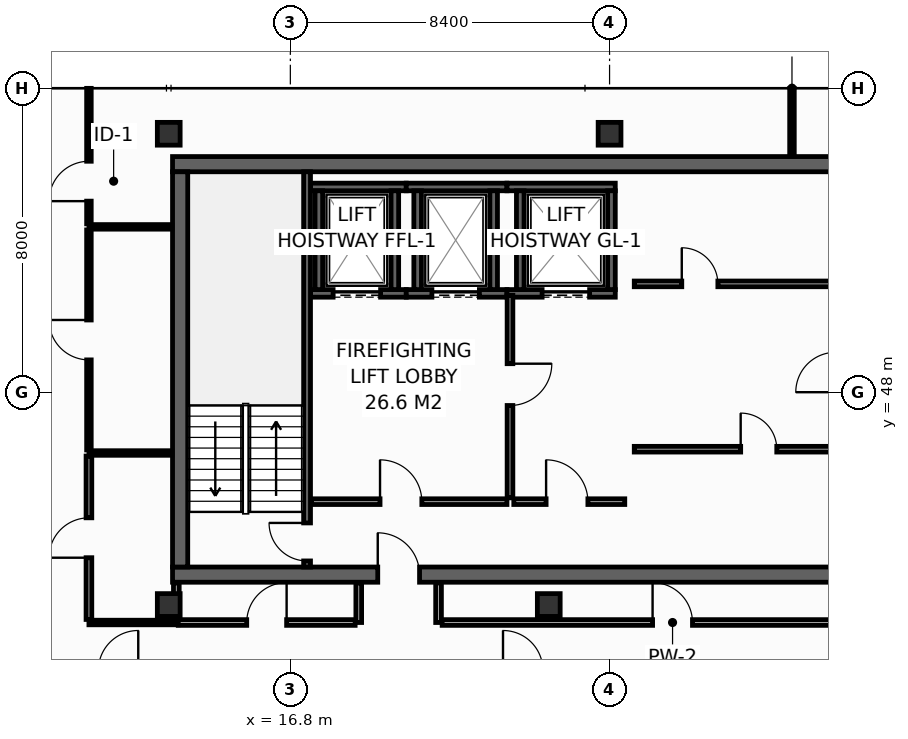
"""IFC4 building model, lengths in metres.
Left out: names, types, materials, properties, quantities, classifications, styles, units other than length and angle.
Written with IfcOpenShell. Run it as: python <this file> out.ifc"""

import sys

from ifc_helpers import new_model, si_unit, direction, frame, frame_2d, origin, origin_2d, place, context, subcontext, project, spatial, rectangle, hollow_rectangle, extrude, element, fill, save


model = new_model("IFC4")
c1 = context("Model", 3, precision=1e-05, world=origin(), true_north=direction((0.0, 1.0)))
c2 = subcontext(c1, "Body", "Model", "MODEL_VIEW")
j1 = project(units=[si_unit("LENGTHUNIT", "METRE"), si_unit("PLANEANGLEUNIT", "RADIAN")], contexts=[c1])
p1 = place(None, origin())
s1 = spatial("IfcSite", under=j1, at=p1, CompositionType="ELEMENT")
p2 = place(p1, origin())
s2 = spatial("IfcBuilding", under=s1, at=p2, CompositionType="ELEMENT")
p3 = place(p2, frame((0.0, 0.0, 299.0)))
s3 = spatial("IfcBuildingStorey", under=s2, at=p3, CompositionType="ELEMENT", Elevation=299.0)
p4 = place(p3, frame((13.7, 43.2, 0.0), z_axis=(0.0, 0.0, 1.0), x_axis=(1.0, 0.0, 0.0)))
e1 = element("IfcWall", 1, at=p4, inside=s3, PredefinedType="SHEAR", context=c2, shape_type="SweptSolid", body=[
    extrude(rectangle(XDim=32.5, YDim=0.4, at=frame_2d((16.25, 0.0))), origin(), (0.0, 0.0, 1.0), 3.55),
])
p5 = place(p4, frame((5.4, 0.0, 0.0)))
e2 = element("IfcOpeningElement", 2, at=p5, cuts=e1, PredefinedType="OPENING", context=c2, shape_type="SweptSolid", body=[
    extrude(rectangle(XDim=1.1, YDim=2.15, at=frame_2d((0.55, 1.075))), frame((0.0, 0.21, 0.0), z_axis=(0.0, -1.0, 0.0), x_axis=(1.0, 0.0, 0.0)), (0.0, 0.0, 1.0), 0.42),
])
p6 = place(p4, frame((25.6, 0.0, 0.0)))
e3 = element("IfcOpeningElement", 3, at=p6, cuts=e1, PredefinedType="OPENING", context=c2, shape_type="SweptSolid", body=[
    extrude(rectangle(XDim=1.1, YDim=2.15, at=frame_2d((0.55, 1.075))), frame((0.0, 0.21, 0.0), z_axis=(0.0, -1.0, 0.0), x_axis=(1.0, 0.0, 0.0)), (0.0, 0.0, 1.0), 0.42),
])
p7 = place(p3, frame((13.7, 54.0, 0.0), z_axis=(0.0, 0.0, 1.0), x_axis=(1.0, 0.0, 0.0)))
e4 = element("IfcWall", 4, at=p7, inside=s3, PredefinedType="SHEAR", context=c2, shape_type="SweptSolid", body=[
    extrude(rectangle(XDim=32.5, YDim=0.4, at=frame_2d((16.25, 0.0))), origin(), (0.0, 0.0, 1.0), 3.55),
])
p8 = place(p3, frame((13.9, 43.4, 0.0), z_axis=(0.0, 0.0, 1.0), x_axis=(0.0, 1.0, 0.0)))
e5 = element("IfcWall", 5, at=p8, inside=s3, PredefinedType="SHEAR", context=c2, shape_type="SweptSolid", body=[
    extrude(rectangle(XDim=10.4, YDim=0.4, at=frame_2d((5.2, 0.0))), origin(), (0.0, 0.0, 1.0), 3.55),
])
for number, where, z_axis, x_axis in (
    (6, (13.6, 54.8, 0.0), (0.0, 0.0, 1.0), (1.0, 0.0, 0.0)),
    (7, (25.2, 54.8, 0.0), (0.0, 0.0, 1.0), (1.0, 0.0, 0.0)),
    (8, (13.6, 42.4, 0.0), (0.0, 0.0, 1.0), (1.0, 0.0, 0.0)),
    (9, (23.6, 42.4, 0.0), (0.0, 0.0, 1.0), (1.0, 0.0, 0.0)),
):
    element("IfcColumn", number, at=place(p3, frame(where, z_axis=z_axis, x_axis=x_axis)), inside=s3, PredefinedType="COLUMN", context=c2, shape_type="SweptSolid", body=[
        extrude(hollow_rectangle(XDim=0.6, YDim=0.6, WallThickness=0.028, at=origin_2d()), origin(), (0.0, 0.0, 1.0), 3.8),
    ])
p9 = place(p3, frame((17.33, 50.6, 0.0), z_axis=(0.0, 0.0, 1.0), x_axis=(1.0, 0.0, 0.0)))
e10 = element("IfcWall", 10, at=p9, inside=s3, PredefinedType="SHEAR", context=c2, shape_type="SweptSolid", body=[
    extrude(rectangle(XDim=2.52, YDim=0.2, at=frame_2d((1.26, 0.0))), origin(), (0.0, 0.0, 1.0), 3.55),
])
p10 = place(p9, frame((0.595, 0.0, 0.0)))
e11 = element("IfcOpeningElement", 11, at=p10, cuts=e10, PredefinedType="OPENING", context=c2, shape_type="SweptSolid", body=[
    extrude(rectangle(XDim=1.25, YDim=2.3, at=frame_2d((0.625, 1.15))), frame((0.0, 0.11, 0.0), z_axis=(0.0, -1.0, 0.0), x_axis=(1.0, 0.0, 0.0)), (0.0, 0.0, 1.0), 0.22),
])
p11 = place(p3, frame((17.33, 53.4, 0.0), z_axis=(0.0, 0.0, 1.0), x_axis=(1.0, 0.0, 0.0)))
e12 = element("IfcWall", 12, at=p11, inside=s3, PredefinedType="SHEAR", context=c2, shape_type="SweptSolid", body=[
    extrude(rectangle(XDim=2.52, YDim=0.2, at=frame_2d((1.26, 0.0))), origin(), (0.0, 0.0, 1.0), 3.55),
])
for number, where, z_axis, x_axis in (
    (13, (17.55, 50.7, 0.0), (0.0, 0.0, 1.0), (0.0, 1.0, 0.0)),
    (14, (19.55, 50.7, 0.0), (0.0, 0.0, 1.0), (0.0, 1.0, 0.0)),
):
    element("IfcWall", number, at=place(p3, frame(where, z_axis=z_axis, x_axis=x_axis)), inside=s3, PredefinedType="SHEAR", context=c2, shape_type="SweptSolid", body=[
        extrude(rectangle(XDim=2.6, YDim=0.2, at=frame_2d((1.3, 0.0))), origin(), (0.0, 0.0, 1.0), 3.55),
    ])
p12 = place(p3, frame((19.85, 50.6, 0.0), z_axis=(0.0, 0.0, 1.0), x_axis=(1.0, 0.0, 0.0)))
e15 = element("IfcWall", 15, at=p12, inside=s3, PredefinedType="SHEAR", context=c2, shape_type="SweptSolid", body=[
    extrude(rectangle(XDim=2.65, YDim=0.2, at=frame_2d((1.325, 0.0))), origin(), (0.0, 0.0, 1.0), 3.55),
])
p13 = place(p12, frame((0.675, 0.0, 0.0)))
e16 = element("IfcOpeningElement", 16, at=p13, cuts=e15, PredefinedType="OPENING", context=c2, shape_type="SweptSolid", body=[
    extrude(rectangle(XDim=1.25, YDim=2.3, at=frame_2d((0.625, 1.15))), frame((0.0, 0.11, 0.0), z_axis=(0.0, -1.0, 0.0), x_axis=(1.0, 0.0, 0.0)), (0.0, 0.0, 1.0), 0.22),
])
p14 = place(p3, frame((19.85, 53.4, 0.0), z_axis=(0.0, 0.0, 1.0), x_axis=(1.0, 0.0, 0.0)))
e17 = element("IfcWall", 17, at=p14, inside=s3, PredefinedType="SHEAR", context=c2, shape_type="SweptSolid", body=[
    extrude(rectangle(XDim=2.65, YDim=0.2, at=frame_2d((1.325, 0.0))), origin(), (0.0, 0.0, 1.0), 3.55),
])
for number, where, z_axis, x_axis in (
    (18, (20.15, 50.7, 0.0), (0.0, 0.0, 1.0), (0.0, 1.0, 0.0)),
    (19, (22.15, 50.7, 0.0), (0.0, 0.0, 1.0), (0.0, 1.0, 0.0)),
):
    element("IfcWall", number, at=place(p3, frame(where, z_axis=z_axis, x_axis=x_axis)), inside=s3, PredefinedType="SHEAR", context=c2, shape_type="SweptSolid", body=[
        extrude(rectangle(XDim=2.6, YDim=0.2, at=frame_2d((1.3, 0.0))), origin(), (0.0, 0.0, 1.0), 3.55),
    ])
p15 = place(p3, frame((22.5, 50.6, 0.0), z_axis=(0.0, 0.0, 1.0), x_axis=(1.0, 0.0, 0.0)))
e20 = element("IfcWall", 20, at=p15, inside=s3, PredefinedType="SHEAR", context=c2, shape_type="SweptSolid", body=[
    extrude(rectangle(XDim=2.85, YDim=0.2, at=frame_2d((1.425, 0.0))), origin(), (0.0, 0.0, 1.0), 3.55),
])
p16 = place(p15, frame((0.925, 0.0, 0.0)))
e21 = element("IfcOpeningElement", 21, at=p16, cuts=e20, PredefinedType="OPENING", context=c2, shape_type="SweptSolid", body=[
    extrude(rectangle(XDim=1.25, YDim=2.3, at=frame_2d((0.625, 1.15))), frame((0.0, 0.11, 0.0), z_axis=(0.0, -1.0, 0.0), x_axis=(1.0, 0.0, 0.0)), (0.0, 0.0, 1.0), 0.22),
])
p17 = place(p3, frame((22.5, 53.4, 0.0), z_axis=(0.0, 0.0, 1.0), x_axis=(1.0, 0.0, 0.0)))
e22 = element("IfcWall", 22, at=p17, inside=s3, PredefinedType="SHEAR", context=c2, shape_type="SweptSolid", body=[
    extrude(rectangle(XDim=2.85, YDim=0.2, at=frame_2d((1.425, 0.0))), origin(), (0.0, 0.0, 1.0), 3.55),
])
for number, where, z_axis, x_axis in (
    (23, (22.85, 50.7, 0.0), (0.0, 0.0, 1.0), (0.0, 1.0, 0.0)),
    (24, (25.25, 50.7, 0.0), (0.0, 0.0, 1.0), (0.0, 1.0, 0.0)),
):
    element("IfcWall", number, at=place(p3, frame(where, z_axis=z_axis, x_axis=x_axis)), inside=s3, PredefinedType="SHEAR", context=c2, shape_type="SweptSolid", body=[
        extrude(rectangle(XDim=2.6, YDim=0.2, at=frame_2d((1.3, 0.0))), origin(), (0.0, 0.0, 1.0), 3.55),
    ])
p18 = place(p3, frame((17.24, 43.4, 0.0), z_axis=(0.0, 0.0, 1.0), x_axis=(0.0, 1.0, 0.0)))
e25 = element("IfcWall", 25, at=p18, inside=s3, PredefinedType="SHEAR", context=c2, shape_type="SweptSolid", body=[
    extrude(rectangle(XDim=10.4, YDim=0.18, at=frame_2d((5.2, 0.0))), origin(), (0.0, 0.0, 1.0), 3.55),
])
p19 = place(p18, frame((0.16, 0.0, 0.0)))
e26 = element("IfcOpeningElement", 26, at=p19, cuts=e25, PredefinedType="OPENING", context=c2, shape_type="SweptSolid", body=[
    extrude(rectangle(XDim=1.0, YDim=2.15, at=frame_2d((0.5, 1.075))), frame((0.0, 0.1, 0.0), z_axis=(0.0, -1.0, 0.0), x_axis=(1.0, 0.0, 0.0)), (0.0, 0.0, 1.0), 0.2),
])
p20 = place(p3, frame((17.36, 45.12, 0.0), z_axis=(0.0, 0.0, 1.0), x_axis=(1.0, 0.0, 0.0)))
e27 = element("IfcWall", 27, at=p20, inside=s3, PredefinedType="PARTITIONING", context=c2, shape_type="SweptSolid", body=[
    extrude(rectangle(XDim=5.14, YDim=0.15, at=frame_2d((2.57, 0.0))), origin(), (0.0, 0.0, 1.0), 3.55),
])
p21 = place(p20, frame((1.8, 0.0, 0.0)))
e28 = element("IfcOpeningElement", 28, at=p21, cuts=e27, PredefinedType="OPENING", context=c2, shape_type="SweptSolid", body=[
    extrude(rectangle(XDim=1.1, YDim=2.15, at=frame_2d((0.55, 1.075))), frame((0.0, 0.085, 0.0), z_axis=(0.0, -1.0, 0.0), x_axis=(1.0, 0.0, 0.0)), (0.0, 0.0, 1.0), 0.17),
])
p22 = place(p3, frame((22.58, 50.55, 0.0), z_axis=(0.0, 0.0, 1.0), x_axis=(0.0, -1.0, 0.0)))
e29 = element("IfcWall", 29, at=p22, inside=s3, PredefinedType="PARTITIONING", context=c2, shape_type="SweptSolid", body=[
    extrude(rectangle(XDim=5.33, YDim=0.15, at=frame_2d((2.665, 0.0))), origin(), (0.0, 0.0, 1.0), 3.55),
])
p23 = place(p22, frame((1.8, 0.0, 0.0)))
e30 = element("IfcOpeningElement", 30, at=p23, cuts=e29, PredefinedType="OPENING", context=c2, shape_type="SweptSolid", body=[
    extrude(rectangle(XDim=1.1, YDim=2.15, at=frame_2d((0.55, 1.075))), frame((0.0, 0.085, 0.0), z_axis=(0.0, -1.0, 0.0), x_axis=(1.0, 0.0, 0.0)), (0.0, 0.0, 1.0), 0.17),
])
p24 = place(p3, frame((22.68, 45.12, 0.0), z_axis=(0.0, 0.0, 1.0), x_axis=(1.0, 0.0, 0.0)))
e31 = element("IfcWall", 31, at=p24, inside=s3, PredefinedType="PARTITIONING", context=c2, shape_type="SweptSolid", body=[
    extrude(rectangle(XDim=2.92, YDim=0.15, at=frame_2d((1.46, 0.0))), origin(), (0.0, 0.0, 1.0), 3.55),
])
p25 = place(p24, frame((0.85, 0.0, 0.0)))
e32 = element("IfcOpeningElement", 32, at=p25, cuts=e31, PredefinedType="OPENING", context=c2, shape_type="SweptSolid", body=[
    extrude(rectangle(XDim=1.1, YDim=2.15, at=frame_2d((0.55, 1.075))), frame((0.0, 0.085, 0.0), z_axis=(0.0, -1.0, 0.0), x_axis=(1.0, 0.0, 0.0)), (0.0, 0.0, 1.0), 0.17),
])
p26 = place(p3, frame((25.85, 50.85, 0.0), z_axis=(0.0, 0.0, 1.0), x_axis=(1.0, 0.0, 0.0)))
e33 = element("IfcWall", 33, at=p26, inside=s3, PredefinedType="PARTITIONING", context=c2, shape_type="SweptSolid", body=[
    extrude(rectangle(XDim=7.65, YDim=0.15, at=frame_2d((3.825, 0.0))), origin(), (0.0, 0.0, 1.0), 3.55),
])
p27 = place(p26, frame((1.25, 0.0, 0.0)))
e34 = element("IfcOpeningElement", 34, at=p27, cuts=e33, PredefinedType="OPENING", context=c2, shape_type="SweptSolid", body=[
    extrude(rectangle(XDim=0.95, YDim=2.15, at=frame_2d((0.475, 1.075))), frame((0.0, 0.085, 0.0), z_axis=(0.0, -1.0, 0.0), x_axis=(1.0, 0.0, 0.0)), (0.0, 0.0, 1.0), 0.17),
])
p28 = place(p3, frame((25.85, 46.5, 0.0), z_axis=(0.0, 0.0, 1.0), x_axis=(1.0, 0.0, 0.0)))
e35 = element("IfcWall", 35, at=p28, inside=s3, PredefinedType="PARTITIONING", context=c2, shape_type="SweptSolid", body=[
    extrude(rectangle(XDim=7.65, YDim=0.15, at=frame_2d((3.825, 0.0))), origin(), (0.0, 0.0, 1.0), 3.55),
])
p29 = place(p28, frame((2.8, 0.0, 0.0)))
e36 = element("IfcOpeningElement", 36, at=p29, cuts=e35, PredefinedType="OPENING", context=c2, shape_type="SweptSolid", body=[
    extrude(rectangle(XDim=0.95, YDim=2.15, at=frame_2d((0.475, 1.075))), frame((0.0, 0.085, 0.0), z_axis=(0.0, -1.0, 0.0), x_axis=(1.0, 0.0, 0.0)), (0.0, 0.0, 1.0), 0.17),
])
p30 = place(p3, frame((11.5, 41.94, 0.0), z_axis=(0.0, 0.0, 1.0), x_axis=(1.0, 0.0, 0.0)))
e37 = element("IfcWall", 37, at=p30, inside=s3, PredefinedType="PARTITIONING", context=c2, shape_type="SweptSolid", body=[
    extrude(rectangle(XDim=2.35, YDim=0.12, at=frame_2d((1.175, 0.0))), origin(), (0.0, 0.0, 1.0), 3.55),
])
p31 = place(p3, frame((11.5, 52.35, 0.0), z_axis=(0.0, 0.0, 1.0), x_axis=(1.0, 0.0, 0.0)))
e38 = element("IfcWall", 38, at=p31, inside=s3, PredefinedType="PARTITIONING", context=c2, shape_type="SweptSolid", body=[
    extrude(rectangle(XDim=2.18, YDim=0.12, at=frame_2d((1.09, 0.0))), origin(), (0.0, 0.0, 1.0), 3.55),
])
p32 = place(p3, frame((30.0, 54.22, 0.0), z_axis=(0.0, 0.0, 1.0), x_axis=(0.0, 1.0, 0.0)))
e39 = element("IfcWall", 39, at=p32, inside=s3, PredefinedType="PARTITIONING", context=c2, shape_type="SweptSolid", body=[
    extrude(rectangle(XDim=1.775, YDim=0.12, at=frame_2d((0.888, 0.0))), origin(), (0.0, 0.0, 1.0), 2.935),
])
p33 = place(p3, frame((11.5, 52.43, 0.0), z_axis=(0.0, 0.0, 1.0), x_axis=(0.0, 1.0, 0.0)))
e40 = element("IfcWall", 40, at=p33, inside=s3, PredefinedType="PARTITIONING", context=c2, shape_type="SweptSolid", body=[
    extrude(rectangle(XDim=3.565, YDim=0.12, at=frame_2d((1.783, 0.0))), origin(), (0.0, 0.0, 1.0), 2.935),
])
p34 = place(p33, frame((0.597, 0.0, 0.0)))
e41 = element("IfcOpeningElement", 41, at=p34, cuts=e40, PredefinedType="OPENING", context=c2, shape_type="SweptSolid", body=[
    extrude(rectangle(XDim=1.05, YDim=2.15, at=frame_2d((0.525, 1.075))), frame((0.0, 0.07, 0.0), z_axis=(0.0, -1.0, 0.0), x_axis=(1.0, 0.0, 0.0)), (0.0, 0.0, 1.0), 0.14),
])
p35 = place(p3, frame((11.5, 46.4, 0.0), z_axis=(0.0, 0.0, 1.0), x_axis=(1.0, 0.0, 0.0)))
e42 = element("IfcWall", 42, at=p35, inside=s3, PredefinedType="PARTITIONING", context=c2, shape_type="SweptSolid", body=[
    extrude(rectangle(XDim=2.18, YDim=0.12, at=frame_2d((1.09, 0.0))), origin(), (0.0, 0.0, 1.0), 3.55),
])
p36 = place(p3, frame((11.5, 42.02, 0.0), z_axis=(0.0, 0.0, 1.0), x_axis=(0.0, 1.0, 0.0)))
e43 = element("IfcWall", 43, at=p36, inside=s3, PredefinedType="PARTITIONING", context=c2, shape_type="SweptSolid", body=[
    extrude(rectangle(XDim=4.3, YDim=0.15, at=frame_2d((2.15, 0.0))), origin(), (0.0, 0.0, 1.0), 2.947),
])
p37 = place(p36, frame((1.625, 0.0, 0.0)))
e44 = element("IfcOpeningElement", 44, at=p37, cuts=e43, PredefinedType="OPENING", context=c2, shape_type="SweptSolid", body=[
    extrude(rectangle(XDim=1.05, YDim=2.15, at=frame_2d((0.525, 1.075))), frame((0.0, 0.085, 0.0), z_axis=(0.0, -1.0, 0.0), x_axis=(1.0, 0.0, 0.0)), (0.0, 0.0, 1.0), 0.17),
])
p38 = place(p3, frame((11.5, 46.48, 0.0), z_axis=(0.0, 0.0, 1.0), x_axis=(0.0, 1.0, 0.0)))
e45 = element("IfcWall", 45, at=p38, inside=s3, PredefinedType="PARTITIONING", context=c2, shape_type="SweptSolid", body=[
    extrude(rectangle(XDim=5.79, YDim=0.12, at=frame_2d((2.895, 0.0))), origin(), (0.0, 0.0, 1.0), 3.55),
])
p39 = place(p38, frame((2.37, 0.0, 0.0)))
e46 = element("IfcOpeningElement", 46, at=p39, cuts=e45, PredefinedType="OPENING", context=c2, shape_type="SweptSolid", body=[
    extrude(rectangle(XDim=1.05, YDim=2.15, at=frame_2d((0.525, 1.075))), frame((0.0, 0.07, 0.0), z_axis=(0.0, -1.0, 0.0), x_axis=(1.0, 0.0, 0.0)), (0.0, 0.0, 1.0), 0.14),
])
p40 = place(p3, frame((13.8, 42.02, 0.0), z_axis=(0.0, 0.0, 1.0), x_axis=(0.0, 1.0, 0.0)))
e47 = element("IfcWall", 47, at=p40, inside=s3, PredefinedType="PARTITIONING", context=c2, shape_type="SweptSolid", body=[
    extrude(rectangle(XDim=0.96, YDim=0.15, at=frame_2d((0.48, 0.0))), origin(), (0.0, 0.0, 1.0), 3.55),
])
for number, where, z_axis, x_axis in (
    (48, (18.6, 41.94, 0.0), (0.0, 0.0, 1.0), (0.0, 1.0, 0.0)),
    (49, (20.7, 41.94, 0.0), (0.0, 0.0, 1.0), (0.0, 1.0, 0.0)),
):
    element("IfcWall", number, at=place(p3, frame(where, z_axis=z_axis, x_axis=x_axis)), inside=s3, PredefinedType="PARTITIONING", context=c2, shape_type="SweptSolid", body=[
        extrude(rectangle(XDim=1.04, YDim=0.15, at=frame_2d((0.52, 0.0))), origin(), (0.0, 0.0, 1.0), 3.55),
    ])
p41 = place(p3, frame((13.85, 41.94, 0.0), z_axis=(0.0, 0.0, 1.0), x_axis=(1.0, 0.0, 0.0)))
e50 = element("IfcWall", 50, at=p41, inside=s3, PredefinedType="PARTITIONING", context=c2, shape_type="SweptSolid", body=[
    extrude(rectangle(XDim=4.655, YDim=0.15, at=frame_2d((2.327, 0.0))), origin(), (0.0, 0.0, 1.0), 3.55),
])
p42 = place(p41, frame((1.802, 0.0, 0.0)))
e51 = element("IfcOpeningElement", 51, at=p42, cuts=e50, PredefinedType="OPENING", context=c2, shape_type="SweptSolid", body=[
    extrude(rectangle(XDim=1.05, YDim=2.15, at=frame_2d((0.525, 1.075))), frame((0.0, 0.085, 0.0), z_axis=(0.0, -1.0, 0.0), x_axis=(1.0, 0.0, 0.0)), (0.0, 0.0, 1.0), 0.17),
])
p43 = place(p3, frame((20.795, 41.94, 0.0), z_axis=(0.0, 0.0, 1.0), x_axis=(1.0, 0.0, 0.0)))
e52 = element("IfcWall", 52, at=p43, inside=s3, PredefinedType="PARTITIONING", context=c2, shape_type="SweptSolid", body=[
    extrude(rectangle(XDim=12.125, YDim=0.15, at=frame_2d((6.062, 0.0))), origin(), (0.0, 0.0, 1.0), 3.047),
])
p44 = place(p43, frame((5.537, 0.0, 0.0)))
e53 = element("IfcOpeningElement", 53, at=p44, cuts=e52, PredefinedType="OPENING", context=c2, shape_type="SweptSolid", body=[
    extrude(rectangle(XDim=1.05, YDim=2.15, at=frame_2d((0.525, 1.075))), frame((0.0, 0.085, 0.0), z_axis=(0.0, -1.0, 0.0), x_axis=(1.0, 0.0, 0.0)), (0.0, 0.0, 1.0), 0.17),
])
p45 = place(p10, origin())
e54 = element("IfcDoor", 54, at=p45, inside=s3, OperationType="SLIDING_TO_LEFT", PredefinedType="DOOR", context=c2, shape_type="SweptSolid", body=[
    extrude(rectangle(XDim=1.25, YDim=2.3, at=frame_2d((0.625, 1.15))), frame((0.0, 0.025, 0.0), z_axis=(0.0, -1.0, 0.0), x_axis=(1.0, 0.0, 0.0)), (0.0, 0.0, 1.0), 0.05),
])
fill(e11, e54)
p46 = place(p13, origin())
e55 = element("IfcDoor", 55, at=p46, inside=s3, OperationType="SLIDING_TO_LEFT", PredefinedType="DOOR", context=c2, shape_type="SweptSolid", body=[
    extrude(rectangle(XDim=1.25, YDim=2.3, at=frame_2d((0.625, 1.15))), frame((0.0, 0.025, 0.0), z_axis=(0.0, -1.0, 0.0), x_axis=(1.0, 0.0, 0.0)), (0.0, 0.0, 1.0), 0.05),
])
fill(e16, e55)
p47 = place(p16, origin())
e56 = element("IfcDoor", 56, at=p47, inside=s3, OperationType="SLIDING_TO_LEFT", PredefinedType="DOOR", context=c2, shape_type="SweptSolid", body=[
    extrude(rectangle(XDim=1.25, YDim=2.3, at=frame_2d((0.625, 1.15))), frame((0.0, 0.025, 0.0), z_axis=(0.0, -1.0, 0.0), x_axis=(1.0, 0.0, 0.0)), (0.0, 0.0, 1.0), 0.05),
])
fill(e21, e56)
p48 = place(p19, origin())
e57 = element("IfcDoor", 57, at=p48, inside=s3, OperationType="SINGLE_SWING_RIGHT", PredefinedType="DOOR", context=c2, shape_type="SweptSolid", body=[
    extrude(rectangle(XDim=1.0, YDim=2.15, at=frame_2d((0.5, 1.075))), frame((0.0, 0.025, 0.0), z_axis=(0.0, -1.0, 0.0), x_axis=(1.0, 0.0, 0.0)), (0.0, 0.0, 1.0), 0.05),
])
fill(e26, e57)
p49 = place(p21, origin())
e58 = element("IfcDoor", 58, at=p49, inside=s3, OperationType="SINGLE_SWING_LEFT", PredefinedType="DOOR", context=c2, shape_type="SweptSolid", body=[
    extrude(rectangle(XDim=1.1, YDim=2.15, at=frame_2d((0.55, 1.075))), frame((0.0, 0.025, 0.0), z_axis=(0.0, -1.0, 0.0), x_axis=(1.0, 0.0, 0.0)), (0.0, 0.0, 1.0), 0.05),
])
fill(e28, e58)
p50 = place(p23, origin())
e59 = element("IfcDoor", 59, at=p50, inside=s3, OperationType="SINGLE_SWING_LEFT", PredefinedType="DOOR", context=c2, shape_type="SweptSolid", body=[
    extrude(rectangle(XDim=1.1, YDim=2.15, at=frame_2d((0.55, 1.075))), frame((0.0, 0.025, 0.0), z_axis=(0.0, -1.0, 0.0), x_axis=(1.0, 0.0, 0.0)), (0.0, 0.0, 1.0), 0.05),
])
fill(e30, e59)
p51 = place(p25, origin())
e60 = element("IfcDoor", 60, at=p51, inside=s3, OperationType="SINGLE_SWING_LEFT", PredefinedType="DOOR", context=c2, shape_type="SweptSolid", body=[
    extrude(rectangle(XDim=1.1, YDim=2.15, at=frame_2d((0.55, 1.075))), frame((0.0, 0.025, 0.0), z_axis=(0.0, -1.0, 0.0), x_axis=(1.0, 0.0, 0.0)), (0.0, 0.0, 1.0), 0.05),
])
fill(e32, e60)
p52 = place(p5, origin())
e61 = element("IfcDoor", 61, at=p52, inside=s3, OperationType="SINGLE_SWING_LEFT", PredefinedType="DOOR", context=c2, shape_type="SweptSolid", body=[
    extrude(rectangle(XDim=1.1, YDim=2.15, at=frame_2d((0.55, 1.075))), frame((0.0, 0.025, 0.0), z_axis=(0.0, -1.0, 0.0), x_axis=(1.0, 0.0, 0.0)), (0.0, 0.0, 1.0), 0.05),
])
fill(e2, e61)
p53 = place(p27, origin())
e62 = element("IfcDoor", 62, at=p53, inside=s3, OperationType="SINGLE_SWING_LEFT", PredefinedType="DOOR", context=c2, shape_type="SweptSolid", body=[
    extrude(rectangle(XDim=0.95, YDim=2.15, at=frame_2d((0.475, 1.075))), frame((0.0, 0.025, 0.0), z_axis=(0.0, -1.0, 0.0), x_axis=(1.0, 0.0, 0.0)), (0.0, 0.0, 1.0), 0.05),
])
fill(e34, e62)
p54 = place(p29, origin())
e63 = element("IfcDoor", 63, at=p54, inside=s3, OperationType="SINGLE_SWING_LEFT", PredefinedType="DOOR", context=c2, shape_type="SweptSolid", body=[
    extrude(rectangle(XDim=0.95, YDim=2.15, at=frame_2d((0.475, 1.075))), frame((0.0, 0.025, 0.0), z_axis=(0.0, -1.0, 0.0), x_axis=(1.0, 0.0, 0.0)), (0.0, 0.0, 1.0), 0.05),
])
fill(e36, e63)
p55 = place(p34, origin())
e64 = element("IfcDoor", 64, at=p55, inside=s3, OperationType="SINGLE_SWING_LEFT", PredefinedType="DOOR", context=c2, shape_type="SweptSolid", body=[
    extrude(rectangle(XDim=1.05, YDim=2.15, at=frame_2d((0.525, 1.075))), frame((0.0, 0.025, 0.0), z_axis=(0.0, -1.0, 0.0), x_axis=(1.0, 0.0, 0.0)), (0.0, 0.0, 1.0), 0.05),
])
fill(e41, e64)
p56 = place(p37, origin())
e65 = element("IfcDoor", 65, at=p56, inside=s3, OperationType="SINGLE_SWING_LEFT", PredefinedType="DOOR", context=c2, shape_type="SweptSolid", body=[
    extrude(rectangle(XDim=1.05, YDim=2.15, at=frame_2d((0.525, 1.075))), frame((0.0, 0.025, 0.0), z_axis=(0.0, -1.0, 0.0), x_axis=(1.0, 0.0, 0.0)), (0.0, 0.0, 1.0), 0.05),
])
fill(e44, e65)
p57 = place(p39, origin())
e66 = element("IfcDoor", 66, at=p57, inside=s3, OperationType="SINGLE_SWING_RIGHT", PredefinedType="DOOR", context=c2, shape_type="SweptSolid", body=[
    extrude(rectangle(XDim=1.05, YDim=2.15, at=frame_2d((0.525, 1.075))), frame((0.0, 0.025, 0.0), z_axis=(0.0, -1.0, 0.0), x_axis=(1.0, 0.0, 0.0)), (0.0, 0.0, 1.0), 0.05),
])
fill(e46, e66)
p58 = place(p42, origin())
e67 = element("IfcDoor", 67, at=p58, inside=s3, OperationType="SINGLE_SWING_RIGHT", PredefinedType="DOOR", context=c2, shape_type="SweptSolid", body=[
    extrude(rectangle(XDim=1.05, YDim=2.15, at=frame_2d((0.525, 1.075))), frame((0.0, 0.025, 0.0), z_axis=(0.0, -1.0, 0.0), x_axis=(1.0, 0.0, 0.0)), (0.0, 0.0, 1.0), 0.05),
])
fill(e51, e67)
p59 = place(p44, origin())
e68 = element("IfcDoor", 68, at=p59, inside=s3, OperationType="SINGLE_SWING_LEFT", PredefinedType="DOOR", context=c2, shape_type="SweptSolid", body=[
    extrude(rectangle(XDim=1.05, YDim=2.15, at=frame_2d((0.525, 1.075))), frame((0.0, 0.025, 0.0), z_axis=(0.0, -1.0, 0.0), x_axis=(1.0, 0.0, 0.0)), (0.0, 0.0, 1.0), 0.05),
])
fill(e53, e68)
save(model, sys.argv[1])
